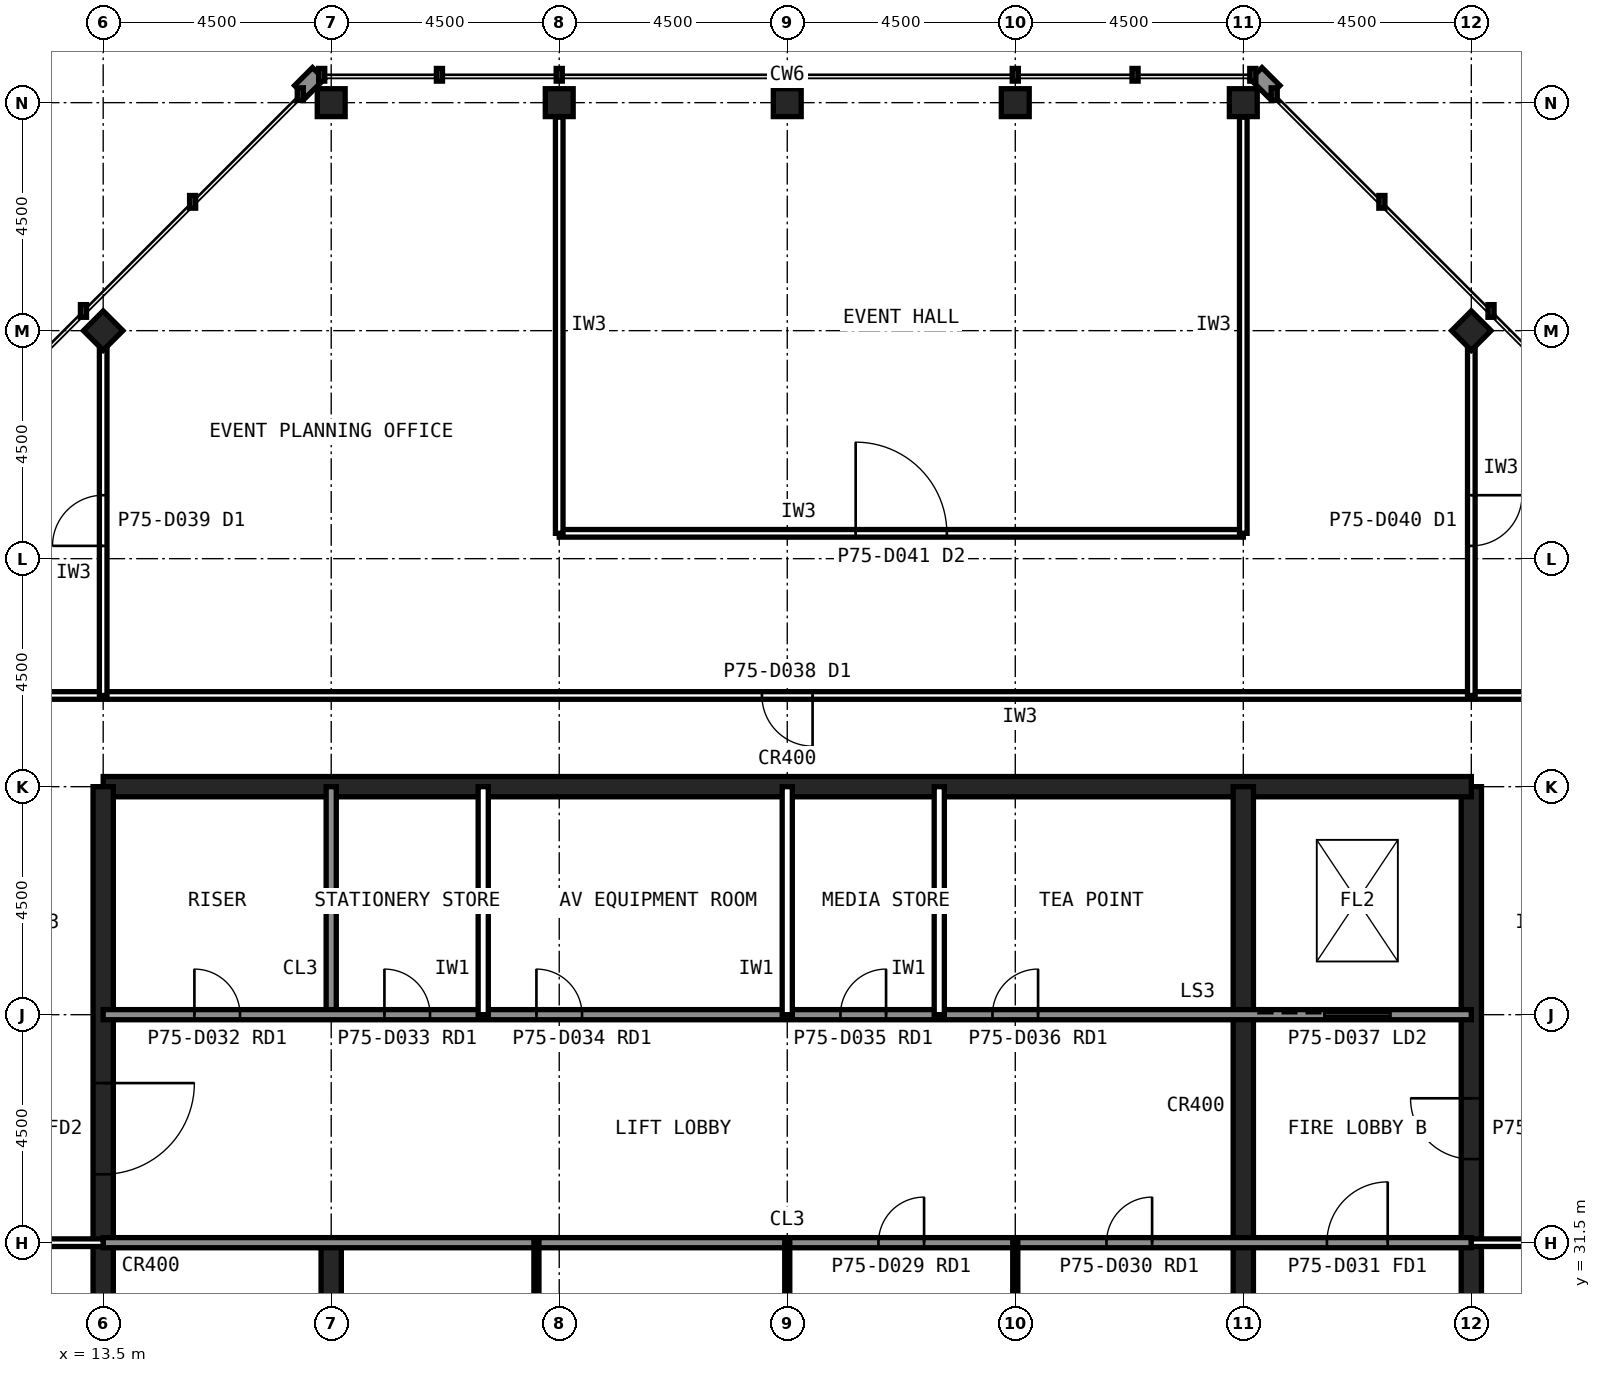
"""IFC4 building model, lengths in metres.
Left out: names, types, materials, properties, quantities, classifications, styles, units other than length and angle.
Written with IfcOpenShell. Run it as: python <this file> out.ifc"""

import sys

from ifc_helpers import new_model, si_unit, direction, frame, frame_2d, origin, origin_2d, place, context, subcontext, project, spatial, rectangle, hollow_rectangle, extrude, element, fill, save


model = new_model("IFC4")
c1 = context("Model", 3, precision=1e-05, world=origin(), true_north=direction((0.0, 1.0)))
c2 = subcontext(c1, "Body", "Model", "MODEL_VIEW")
j1 = project(units=[si_unit("LENGTHUNIT", "METRE"), si_unit("PLANEANGLEUNIT", "RADIAN")], contexts=[c1])
p1 = place(None, origin())
s1 = spatial("IfcSite", under=j1, at=p1, CompositionType="ELEMENT")
p2 = place(p1, origin())
s2 = spatial("IfcBuilding", under=s1, at=p2, CompositionType="ELEMENT")
p3 = place(p2, frame((0.0, 0.0, 315.1)))
s3 = spatial("IfcBuildingStorey", under=s2, at=p3, CompositionType="ELEMENT", Elevation=315.1)
for number, where, z_axis, x_axis in (
    (1, (36.0, 54.0, 0.0), (0.0, 0.0, 1.0), (1.0, 0.0, 0.0)),
    (2, (31.5, 54.0, 0.0), (0.0, 0.0, 1.0), (1.0, 0.0, 0.0)),
    (3, (27.0, 54.0, 0.0), (0.0, 0.0, 1.0), (1.0, 0.0, 0.0)),
    (4, (22.5, 54.0, 0.0), (0.0, 0.0, 1.0), (1.0, 0.0, 0.0)),
    (5, (18.0, 54.0, 0.0), (0.0, 0.0, 1.0), (1.0, 0.0, 0.0)),
    (6, (40.5, 49.5, 0.0), (0.0, 0.0, 1.0), (0.707, 0.707, 0.0)),
    (7, (13.5, 49.5, 0.0), (0.0, 0.0, 1.0), (0.707, 0.707, 0.0)),
):
    element("IfcColumn", number, at=place(p3, frame(where, z_axis=z_axis, x_axis=x_axis)), inside=s3, PredefinedType="COLUMN", context=c2, shape_type="SweptSolid", body=[
        extrude(hollow_rectangle(XDim=0.55, YDim=0.55, WallThickness=0.025, at=origin_2d()), origin(), (0.0, 0.0, 1.0), 5.0),
    ])
p4 = place(p3, frame((40.5, 13.5, 0.0), z_axis=(0.0, 0.0, 1.0), x_axis=(0.0, 1.0, 0.0)))
e8 = element("IfcWall", 8, at=p4, inside=s3, PredefinedType="SHEAR", context=c2, shape_type="SweptSolid", body=[
    extrude(rectangle(XDim=27.0, YDim=0.4, at=frame_2d((13.5, 0.0))), origin(), (0.0, 0.0, 1.0), 5.0),
])
p5 = place(p4, frame((5.85, 0.0, 0.0)))
e9 = element("IfcOpeningElement", 9, at=p5, cuts=e8, PredefinedType="OPENING", context=c2, shape_type="SweptSolid", body=[
    extrude(rectangle(XDim=1.8, YDim=2.1, at=frame_2d((0.9, 1.05))), frame((0.0, 0.21, 0.0), z_axis=(0.0, -1.0, 0.0), x_axis=(1.0, 0.0, 0.0)), (0.0, 0.0, 1.0), 0.42),
])
p6 = place(p4, frame((19.65, 0.0, 0.0)))
e10 = element("IfcOpeningElement", 10, at=p6, cuts=e8, PredefinedType="OPENING", context=c2, shape_type="SweptSolid", body=[
    extrude(rectangle(XDim=1.2, YDim=2.1, at=frame_2d((0.6, 1.05))), frame((0.0, 0.21, 0.0), z_axis=(0.0, -1.0, 0.0), x_axis=(1.0, 0.0, 0.0)), (0.0, 0.0, 1.0), 0.42),
])
p7 = place(p3, frame((40.5, 40.5, 0.0), z_axis=(0.0, 0.0, 1.0), x_axis=(-1.0, 0.0, 0.0)))
e11 = element("IfcWall", 11, at=p7, inside=s3, PredefinedType="SHEAR", context=c2, shape_type="SweptSolid", body=[
    extrude(rectangle(XDim=27.0, YDim=0.4, at=frame_2d((13.5, 0.0))), origin(), (0.0, 0.0, 1.0), 5.0),
])
p8 = place(p3, frame((13.5, 40.5, 0.0), z_axis=(0.0, 0.0, 1.0), x_axis=(0.0, -1.0, 0.0)))
e12 = element("IfcWall", 12, at=p8, inside=s3, PredefinedType="SHEAR", context=c2, shape_type="SweptSolid", body=[
    extrude(rectangle(XDim=27.0, YDim=0.4, at=frame_2d((13.5, 0.0))), origin(), (0.0, 0.0, 1.0), 5.0),
])
p9 = place(p8, frame((19.65, 0.0, 0.0)))
e13 = element("IfcOpeningElement", 13, at=p9, cuts=e12, PredefinedType="OPENING", context=c2, shape_type="SweptSolid", body=[
    extrude(rectangle(XDim=1.2, YDim=2.1, at=frame_2d((0.6, 1.05))), frame((0.0, 0.21, 0.0), z_axis=(0.0, -1.0, 0.0), x_axis=(1.0, 0.0, 0.0)), (0.0, 0.0, 1.0), 0.42),
])
p10 = place(p8, frame((5.85, 0.0, 0.0)))
e14 = element("IfcOpeningElement", 14, at=p10, cuts=e12, PredefinedType="OPENING", context=c2, shape_type="SweptSolid", body=[
    extrude(rectangle(XDim=1.8, YDim=2.1, at=frame_2d((0.9, 1.05))), frame((0.0, 0.21, 0.0), z_axis=(0.0, -1.0, 0.0), x_axis=(1.0, 0.0, 0.0)), (0.0, 0.0, 1.0), 0.42),
])
p11 = place(p3, frame((18.0, 13.5, 0.0), z_axis=(0.0, 0.0, 1.0), x_axis=(0.0, 1.0, 0.0)))
e15 = element("IfcWall", 15, at=p11, inside=s3, PredefinedType="SHEAR", context=c2, shape_type="SweptSolid", body=[
    extrude(rectangle(XDim=18.0, YDim=0.4, at=frame_2d((9.0, 0.0))), origin(), (0.0, 0.0, 1.0), 5.0),
])
p12 = place(p3, frame((18.0, 36.0, 0.0), z_axis=(0.0, 0.0, 1.0), x_axis=(0.0, 1.0, 0.0)))
e16 = element("IfcWall", 16, at=p12, inside=s3, PredefinedType="SOLIDWALL", context=c2, shape_type="SweptSolid", body=[
    extrude(rectangle(XDim=4.5, YDim=0.2, at=frame_2d((2.25, 0.0))), origin(), (0.0, 0.0, 1.0), 4.8),
])
p13 = place(p3, frame((36.0, 22.5, 0.0), z_axis=(0.0, 0.0, 1.0), x_axis=(0.0, 1.0, 0.0)))
e17 = element("IfcWall", 17, at=p13, inside=s3, PredefinedType="SHEAR", context=c2, shape_type="SweptSolid", body=[
    extrude(rectangle(XDim=18.0, YDim=0.4, at=frame_2d((9.0, 0.0))), origin(), (0.0, 0.0, 1.0), 5.0),
])
p14 = place(p3, frame((13.5, 36.0, 0.0), z_axis=(0.0, 0.0, 1.0), x_axis=(1.0, 0.0, 0.0)))
e18 = element("IfcWall", 18, at=p14, inside=s3, PredefinedType="SOLIDWALL", context=c2, shape_type="SweptSolid", body=[
    extrude(rectangle(XDim=27.0, YDim=0.2, at=frame_2d((13.5, 0.0))), origin(), (0.0, 0.0, 1.0), 4.8),
])
p15 = place(p14, frame((1.8, 0.0, 0.0)))
e19 = element("IfcOpeningElement", 19, at=p15, cuts=e18, PredefinedType="OPENING", context=c2, shape_type="SweptSolid", body=[
    extrude(rectangle(XDim=0.9, YDim=2.1, at=frame_2d((0.45, 1.05))), frame((0.0, 0.11, 0.0), z_axis=(0.0, -1.0, 0.0), x_axis=(1.0, 0.0, 0.0)), (0.0, 0.0, 1.0), 0.22),
])
p16 = place(p14, frame((5.55, 0.0, 0.0)))
e20 = element("IfcOpeningElement", 20, at=p16, cuts=e18, PredefinedType="OPENING", context=c2, shape_type="SweptSolid", body=[
    extrude(rectangle(XDim=0.9, YDim=2.1, at=frame_2d((0.45, 1.05))), frame((0.0, 0.11, 0.0), z_axis=(0.0, -1.0, 0.0), x_axis=(1.0, 0.0, 0.0)), (0.0, 0.0, 1.0), 0.22),
])
p17 = place(p14, frame((8.55, 0.0, 0.0)))
e21 = element("IfcOpeningElement", 21, at=p17, cuts=e18, PredefinedType="OPENING", context=c2, shape_type="SweptSolid", body=[
    extrude(rectangle(XDim=0.9, YDim=2.1, at=frame_2d((0.45, 1.05))), frame((0.0, 0.11, 0.0), z_axis=(0.0, -1.0, 0.0), x_axis=(1.0, 0.0, 0.0)), (0.0, 0.0, 1.0), 0.22),
])
p18 = place(p14, frame((14.55, 0.0, 0.0)))
e22 = element("IfcOpeningElement", 22, at=p18, cuts=e18, PredefinedType="OPENING", context=c2, shape_type="SweptSolid", body=[
    extrude(rectangle(XDim=0.9, YDim=2.1, at=frame_2d((0.45, 1.05))), frame((0.0, 0.11, 0.0), z_axis=(0.0, -1.0, 0.0), x_axis=(1.0, 0.0, 0.0)), (0.0, 0.0, 1.0), 0.22),
])
p19 = place(p14, frame((17.55, 0.0, 0.0)))
e23 = element("IfcOpeningElement", 23, at=p19, cuts=e18, PredefinedType="OPENING", context=c2, shape_type="SweptSolid", body=[
    extrude(rectangle(XDim=0.9, YDim=2.1, at=frame_2d((0.45, 1.05))), frame((0.0, 0.11, 0.0), z_axis=(0.0, -1.0, 0.0), x_axis=(1.0, 0.0, 0.0)), (0.0, 0.0, 1.0), 0.22),
])
p20 = place(p14, frame((24.1, 0.0, 0.0)))
e24 = element("IfcOpeningElement", 24, at=p20, cuts=e18, PredefinedType="OPENING", context=c2, shape_type="SweptSolid", body=[
    extrude(rectangle(XDim=1.3, YDim=2.2, at=frame_2d((0.65, 1.1))), frame((0.0, 0.11, 0.0), z_axis=(0.0, -1.0, 0.0), x_axis=(1.0, 0.0, 0.0)), (0.0, 0.0, 1.0), 0.22),
])
p21 = place(p3, frame((13.5, 31.5, 0.0), z_axis=(0.0, 0.0, 1.0), x_axis=(1.0, 0.0, 0.0)))
e25 = element("IfcWall", 25, at=p21, inside=s3, PredefinedType="SOLIDWALL", context=c2, shape_type="SweptSolid", body=[
    extrude(rectangle(XDim=27.0, YDim=0.2, at=frame_2d((13.5, 0.0))), origin(), (0.0, 0.0, 1.0), 4.8),
])
p22 = place(p21, frame((24.15, 0.0, 0.0)))
e26 = element("IfcOpeningElement", 26, at=p22, cuts=e25, PredefinedType="OPENING", context=c2, shape_type="SweptSolid", body=[
    extrude(rectangle(XDim=1.2, YDim=2.1, at=frame_2d((0.6, 1.05))), frame((0.0, 0.11, 0.0), z_axis=(0.0, -1.0, 0.0), x_axis=(1.0, 0.0, 0.0)), (0.0, 0.0, 1.0), 0.22),
])
p23 = place(p21, frame((15.3, 0.0, 0.0)))
e27 = element("IfcOpeningElement", 27, at=p23, cuts=e25, PredefinedType="OPENING", context=c2, shape_type="SweptSolid", body=[
    extrude(rectangle(XDim=0.9, YDim=2.1, at=frame_2d((0.45, 1.05))), frame((0.0, 0.11, 0.0), z_axis=(0.0, -1.0, 0.0), x_axis=(1.0, 0.0, 0.0)), (0.0, 0.0, 1.0), 0.22),
])
p24 = place(p21, frame((19.8, 0.0, 0.0)))
e28 = element("IfcOpeningElement", 28, at=p24, cuts=e25, PredefinedType="OPENING", context=c2, shape_type="SweptSolid", body=[
    extrude(rectangle(XDim=0.9, YDim=2.1, at=frame_2d((0.45, 1.05))), frame((0.0, 0.11, 0.0), z_axis=(0.0, -1.0, 0.0), x_axis=(1.0, 0.0, 0.0)), (0.0, 0.0, 1.0), 0.22),
])
for number, where, z_axis, x_axis in (
    (29, (21.0, 36.0, 0.0), (0.0, 0.0, 1.0), (0.0, 1.0, 0.0)),
    (30, (27.0, 36.0, 0.0), (0.0, 0.0, 1.0), (0.0, 1.0, 0.0)),
    (31, (30.0, 36.0, 0.0), (0.0, 0.0, 1.0), (0.0, 1.0, 0.0)),
):
    element("IfcWall", number, at=place(p3, frame(where, z_axis=z_axis, x_axis=x_axis)), inside=s3, PredefinedType="PARTITIONING", context=c2, shape_type="SweptSolid", body=[
        extrude(rectangle(XDim=4.5, YDim=0.2, at=frame_2d((2.25, 0.0))), origin(), (0.0, 0.0, 1.0), 4.8),
    ])
for number, where, z_axis, x_axis in (
    (32, (22.05, 22.5, 0.0), (0.0, 0.0, 1.0), (0.0, 1.0, 0.0)),
    (33, (27.0, 22.5, 0.0), (0.0, 0.0, 1.0), (0.0, 1.0, 0.0)),
    (34, (31.5, 22.5, 0.0), (0.0, 0.0, 1.0), (0.0, 1.0, 0.0)),
):
    element("IfcWall", number, at=place(p3, frame(where, z_axis=z_axis, x_axis=x_axis)), inside=s3, PredefinedType="PLUMBINGWALL", context=c2, shape_type="SweptSolid", body=[
        extrude(rectangle(XDim=9.0, YDim=0.1, at=frame_2d((4.5, 0.0))), origin(), (0.0, 0.0, 1.0), 4.8),
    ])
p25 = place(p3, frame((42.3, 42.3, 0.0), z_axis=(0.0, 0.0, 1.0), x_axis=(-1.0, 0.0, 0.0)))
e35 = element("IfcWall", 35, at=p25, inside=s3, PredefinedType="PARTITIONING", context=c2, shape_type="SweptSolid", body=[
    extrude(rectangle(XDim=30.6, YDim=0.15, at=frame_2d((15.3, 0.0))), origin(), (0.0, 0.0, 1.0), 4.8),
])
p26 = place(p25, frame((14.8, 0.0, 0.0)))
e36 = element("IfcOpeningElement", 36, at=p26, cuts=e35, PredefinedType="OPENING", context=c2, shape_type="SweptSolid", body=[
    extrude(rectangle(XDim=1.0, YDim=2.1, at=frame_2d((0.5, 1.05))), frame((0.0, 0.085, 0.0), z_axis=(0.0, -1.0, 0.0), x_axis=(1.0, 0.0, 0.0)), (0.0, 0.0, 1.0), 0.17),
])
p27 = place(p3, frame((22.5, 45.5, 0.0), z_axis=(0.0, 0.0, 1.0), x_axis=(1.0, 0.0, 0.0)))
e37 = element("IfcWall", 37, at=p27, inside=s3, PredefinedType="PARTITIONING", context=c2, shape_type="SweptSolid", body=[
    extrude(rectangle(XDim=13.5, YDim=0.15, at=frame_2d((6.75, 0.0))), origin(), (0.0, 0.0, 1.0), 4.8),
])
p28 = place(p27, frame((5.85, 0.0, 0.0)))
e38 = element("IfcOpeningElement", 38, at=p28, cuts=e37, PredefinedType="OPENING", context=c2, shape_type="SweptSolid", body=[
    extrude(rectangle(XDim=1.8, YDim=2.4, at=frame_2d((0.9, 1.2))), frame((0.0, 0.085, 0.0), z_axis=(0.0, -1.0, 0.0), x_axis=(1.0, 0.0, 0.0)), (0.0, 0.0, 1.0), 0.17),
])
for number, where, z_axis, x_axis in (
    (39, (36.0, 45.5, 0.0), (0.0, 0.0, 1.0), (0.0, 1.0, 0.0)),
    (40, (22.5, 53.715, 0.0), (0.0, 0.0, 1.0), (0.0, -1.0, 0.0)),
):
    element("IfcWall", number, at=place(p3, frame(where, z_axis=z_axis, x_axis=x_axis)), inside=s3, PredefinedType="PARTITIONING", context=c2, shape_type="SweptSolid", body=[
        extrude(rectangle(XDim=8.215, YDim=0.15, at=frame_2d((4.107, 0.0))), origin(), (0.0, 0.0, 1.0), 3.868),
    ])
for number, where, z_axis, x_axis in (
    (41, (45.0, 31.5, 0.0), (0.0, 0.0, 1.0), (-1.0, 0.0, 0.0)),
    (42, (13.5, 31.5, 0.0), (0.0, 0.0, 1.0), (-1.0, 0.0, 0.0)),
):
    element("IfcWall", number, at=place(p3, frame(where, z_axis=z_axis, x_axis=x_axis)), inside=s3, PredefinedType="PARTITIONING", context=c2, shape_type="SweptSolid", body=[
        extrude(rectangle(XDim=4.5, YDim=0.15, at=frame_2d((2.25, 0.0))), origin(), (0.0, 0.0, 1.0), 3.868),
    ])
p29 = place(p3, frame((40.5, 49.205, 0.0), z_axis=(0.0, 0.0, 1.0), x_axis=(0.0, -1.0, 0.0)))
e43 = element("IfcWall", 43, at=p29, inside=s3, PredefinedType="PARTITIONING", context=c2, shape_type="SweptSolid", body=[
    extrude(rectangle(XDim=6.905, YDim=0.15, at=frame_2d((3.453, 0.0))), origin(), (0.0, 0.0, 1.0), 3.868),
])
p30 = place(p29, frame((2.952, 0.0, 0.0)))
e44 = element("IfcOpeningElement", 44, at=p30, cuts=e43, PredefinedType="OPENING", context=c2, shape_type="SweptSolid", body=[
    extrude(rectangle(XDim=1.0, YDim=2.1, at=frame_2d((0.5, 1.05))), frame((0.0, 0.085, 0.0), z_axis=(0.0, -1.0, 0.0), x_axis=(1.0, 0.0, 0.0)), (0.0, 0.0, 1.0), 0.17),
])
p31 = place(p3, frame((13.5, 42.3, 0.0), z_axis=(0.0, 0.0, 1.0), x_axis=(0.0, 1.0, 0.0)))
e45 = element("IfcWall", 45, at=p31, inside=s3, PredefinedType="PARTITIONING", context=c2, shape_type="SweptSolid", body=[
    extrude(rectangle(XDim=6.905, YDim=0.15, at=frame_2d((3.453, 0.0))), origin(), (0.0, 0.0, 1.0), 3.868),
])
p32 = place(p31, frame((2.952, 0.0, 0.0)))
e46 = element("IfcOpeningElement", 46, at=p32, cuts=e45, PredefinedType="OPENING", context=c2, shape_type="SweptSolid", body=[
    extrude(rectangle(XDim=1.0, YDim=2.1, at=frame_2d((0.5, 1.05))), frame((0.0, 0.085, 0.0), z_axis=(0.0, -1.0, 0.0), x_axis=(1.0, 0.0, 0.0)), (0.0, 0.0, 1.0), 0.17),
])
p33 = place(p10, origin())
e47 = element("IfcDoor", 47, at=p33, inside=s3, OperationType="SINGLE_SWING_LEFT", PredefinedType="DOOR", context=c2, shape_type="SweptSolid", body=[
    extrude(rectangle(XDim=1.8, YDim=2.1, at=frame_2d((0.9, 1.05))), frame((0.0, 0.025, 0.0), z_axis=(0.0, -1.0, 0.0), x_axis=(1.0, 0.0, 0.0)), (0.0, 0.0, 1.0), 0.05),
])
fill(e14, e47)
p34 = place(p6, origin())
e48 = element("IfcDoor", 48, at=p34, inside=s3, OperationType="SINGLE_SWING_RIGHT", PredefinedType="DOOR", context=c2, shape_type="SweptSolid", body=[
    extrude(rectangle(XDim=1.2, YDim=2.1, at=frame_2d((0.6, 1.05))), frame((0.0, 0.025, 0.0), z_axis=(0.0, -1.0, 0.0), x_axis=(1.0, 0.0, 0.0)), (0.0, 0.0, 1.0), 0.05),
])
fill(e10, e48)
p35 = place(p22, origin())
e49 = element("IfcDoor", 49, at=p35, inside=s3, OperationType="SINGLE_SWING_RIGHT", PredefinedType="DOOR", context=c2, shape_type="SweptSolid", body=[
    extrude(rectangle(XDim=1.2, YDim=2.1, at=frame_2d((0.6, 1.05))), frame((0.0, 0.025, 0.0), z_axis=(0.0, -1.0, 0.0), x_axis=(1.0, 0.0, 0.0)), (0.0, 0.0, 1.0), 0.05),
])
fill(e26, e49)
p36 = place(p23, origin())
e50 = element("IfcDoor", 50, at=p36, inside=s3, OperationType="SINGLE_SWING_RIGHT", PredefinedType="DOOR", context=c2, shape_type="SweptSolid", body=[
    extrude(rectangle(XDim=0.9, YDim=2.1, at=frame_2d((0.45, 1.05))), frame((0.0, 0.025, 0.0), z_axis=(0.0, -1.0, 0.0), x_axis=(1.0, 0.0, 0.0)), (0.0, 0.0, 1.0), 0.05),
])
fill(e27, e50)
p37 = place(p24, origin())
e51 = element("IfcDoor", 51, at=p37, inside=s3, OperationType="SINGLE_SWING_RIGHT", PredefinedType="DOOR", context=c2, shape_type="SweptSolid", body=[
    extrude(rectangle(XDim=0.9, YDim=2.1, at=frame_2d((0.45, 1.05))), frame((0.0, 0.025, 0.0), z_axis=(0.0, -1.0, 0.0), x_axis=(1.0, 0.0, 0.0)), (0.0, 0.0, 1.0), 0.05),
])
fill(e28, e51)
p38 = place(p15, origin())
e52 = element("IfcDoor", 52, at=p38, inside=s3, OperationType="SINGLE_SWING_LEFT", PredefinedType="DOOR", context=c2, shape_type="SweptSolid", body=[
    extrude(rectangle(XDim=0.9, YDim=2.1, at=frame_2d((0.45, 1.05))), frame((0.0, 0.025, 0.0), z_axis=(0.0, -1.0, 0.0), x_axis=(1.0, 0.0, 0.0)), (0.0, 0.0, 1.0), 0.05),
])
fill(e19, e52)
p39 = place(p16, origin())
e53 = element("IfcDoor", 53, at=p39, inside=s3, OperationType="SINGLE_SWING_LEFT", PredefinedType="DOOR", context=c2, shape_type="SweptSolid", body=[
    extrude(rectangle(XDim=0.9, YDim=2.1, at=frame_2d((0.45, 1.05))), frame((0.0, 0.025, 0.0), z_axis=(0.0, -1.0, 0.0), x_axis=(1.0, 0.0, 0.0)), (0.0, 0.0, 1.0), 0.05),
])
fill(e20, e53)
p40 = place(p17, origin())
e54 = element("IfcDoor", 54, at=p40, inside=s3, OperationType="SINGLE_SWING_LEFT", PredefinedType="DOOR", context=c2, shape_type="SweptSolid", body=[
    extrude(rectangle(XDim=0.9, YDim=2.1, at=frame_2d((0.45, 1.05))), frame((0.0, 0.025, 0.0), z_axis=(0.0, -1.0, 0.0), x_axis=(1.0, 0.0, 0.0)), (0.0, 0.0, 1.0), 0.05),
])
fill(e21, e54)
p41 = place(p18, origin())
e55 = element("IfcDoor", 55, at=p41, inside=s3, OperationType="SINGLE_SWING_RIGHT", PredefinedType="DOOR", context=c2, shape_type="SweptSolid", body=[
    extrude(rectangle(XDim=0.9, YDim=2.1, at=frame_2d((0.45, 1.05))), frame((0.0, 0.025, 0.0), z_axis=(0.0, -1.0, 0.0), x_axis=(1.0, 0.0, 0.0)), (0.0, 0.0, 1.0), 0.05),
])
fill(e22, e55)
p42 = place(p19, origin())
e56 = element("IfcDoor", 56, at=p42, inside=s3, OperationType="SINGLE_SWING_RIGHT", PredefinedType="DOOR", context=c2, shape_type="SweptSolid", body=[
    extrude(rectangle(XDim=0.9, YDim=2.1, at=frame_2d((0.45, 1.05))), frame((0.0, 0.025, 0.0), z_axis=(0.0, -1.0, 0.0), x_axis=(1.0, 0.0, 0.0)), (0.0, 0.0, 1.0), 0.05),
])
fill(e23, e56)
p43 = place(p20, origin())
e57 = element("IfcDoor", 57, at=p43, inside=s3, OperationType="SLIDING_TO_LEFT", PredefinedType="DOOR", context=c2, shape_type="SweptSolid", body=[
    extrude(rectangle(XDim=1.3, YDim=2.2, at=frame_2d((0.65, 1.1))), frame((0.0, 0.025, 0.0), z_axis=(0.0, -1.0, 0.0), x_axis=(1.0, 0.0, 0.0)), (0.0, 0.0, 1.0), 0.05),
])
fill(e24, e57)
p44 = place(p26, origin())
e58 = element("IfcDoor", 58, at=p44, inside=s3, OperationType="SINGLE_SWING_LEFT", PredefinedType="DOOR", context=c2, shape_type="SweptSolid", body=[
    extrude(rectangle(XDim=1.0, YDim=2.1, at=frame_2d((0.5, 1.05))), frame((0.0, 0.025, 0.0), z_axis=(0.0, -1.0, 0.0), x_axis=(1.0, 0.0, 0.0)), (0.0, 0.0, 1.0), 0.05),
])
fill(e36, e58)
p45 = place(p28, origin())
e59 = element("IfcDoor", 59, at=p45, inside=s3, OperationType="SINGLE_SWING_LEFT", PredefinedType="DOOR", context=c2, shape_type="SweptSolid", body=[
    extrude(rectangle(XDim=1.8, YDim=2.4, at=frame_2d((0.9, 1.2))), frame((0.0, 0.025, 0.0), z_axis=(0.0, -1.0, 0.0), x_axis=(1.0, 0.0, 0.0)), (0.0, 0.0, 1.0), 0.05),
])
fill(e38, e59)
p46 = place(p30, origin())
e60 = element("IfcDoor", 60, at=p46, inside=s3, OperationType="SINGLE_SWING_LEFT", PredefinedType="DOOR", context=c2, shape_type="SweptSolid", body=[
    extrude(rectangle(XDim=1.0, YDim=2.1, at=frame_2d((0.5, 1.05))), frame((0.0, 0.025, 0.0), z_axis=(0.0, -1.0, 0.0), x_axis=(1.0, 0.0, 0.0)), (0.0, 0.0, 1.0), 0.05),
])
fill(e44, e60)
p47 = place(p32, origin())
e61 = element("IfcDoor", 61, at=p47, inside=s3, OperationType="SINGLE_SWING_LEFT", PredefinedType="DOOR", context=c2, shape_type="SweptSolid", body=[
    extrude(rectangle(XDim=1.0, YDim=2.1, at=frame_2d((0.5, 1.05))), frame((0.0, 0.025, 0.0), z_axis=(0.0, -1.0, 0.0), x_axis=(1.0, 0.0, 0.0)), (0.0, 0.0, 1.0), 0.05),
])
fill(e46, e61)
save(model, sys.argv[1])
